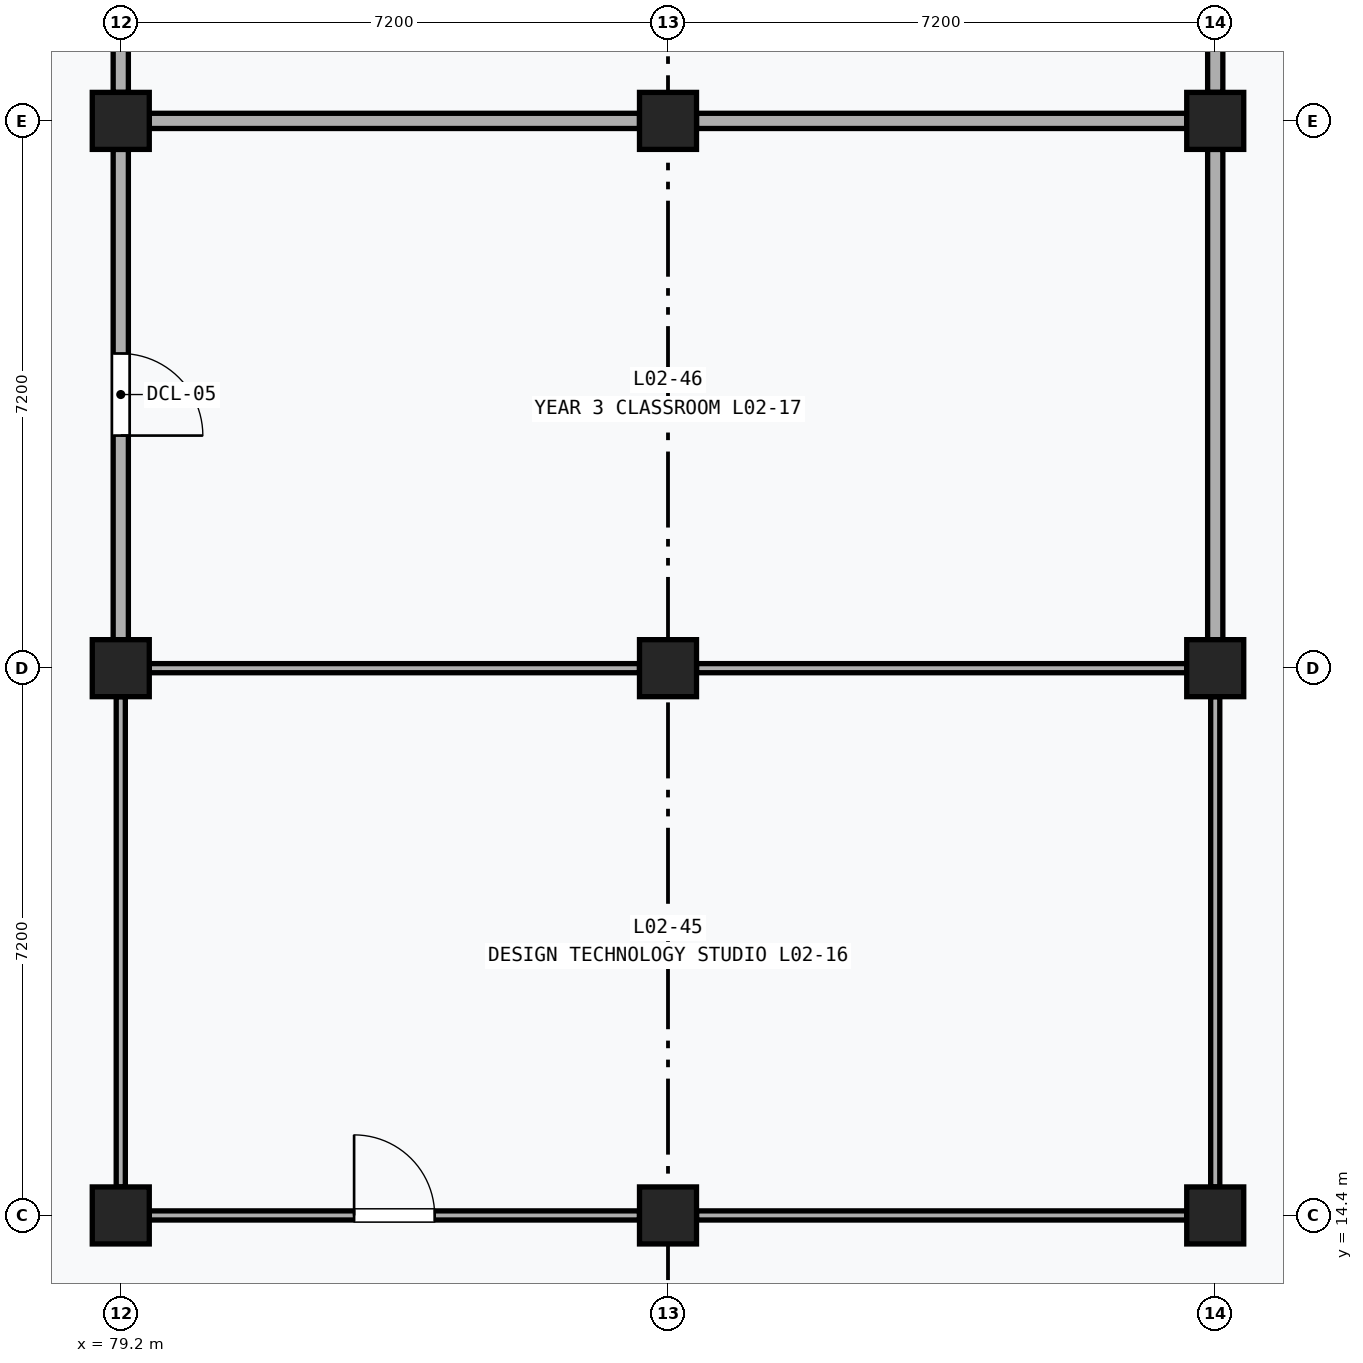
"""IFC4 building model, lengths in metres.
Left out: names, types, materials, properties, quantities, classifications, styles, units other than length and angle.
Written with IfcOpenShell. Run it as: python <this file> out.ifc"""

import sys

from ifc_helpers import new_model, si_unit, direction, frame, frame_2d, origin, origin_2d, place, context, subcontext, project, spatial, rectangle, extrude, element, fill, save


model = new_model("IFC4")
c1 = context("Model", 3, precision=1e-05, world=origin(), true_north=direction((0.0, 1.0)))
c2 = subcontext(c1, "Body", "Model", "MODEL_VIEW")
j1 = project(units=[si_unit("LENGTHUNIT", "METRE"), si_unit("PLANEANGLEUNIT", "RADIAN")], contexts=[c1])
p1 = place(None, origin())
s1 = spatial("IfcSite", under=j1, at=p1, CompositionType="ELEMENT")
p2 = place(p1, origin())
s2 = spatial("IfcBuilding", under=s1, at=p2, CompositionType="ELEMENT")
p3 = place(p2, frame((0.0, 0.0, 9.6)))
s3 = spatial("IfcBuildingStorey", under=s2, at=p3, CompositionType="ELEMENT", Elevation=9.6)
for number, where, z_axis, x_axis in (
    (1, (79.2, 14.4, 0.0), (0.0, 0.0, 1.0), (1.0, 0.0, 0.0)),
    (2, (79.2, 21.6, 0.0), (0.0, 0.0, 1.0), (1.0, 0.0, 0.0)),
    (3, (79.2, 28.8, 0.0), (0.0, 0.0, 1.0), (1.0, 0.0, 0.0)),
    (4, (86.4, 14.4, 0.0), (0.0, 0.0, 1.0), (1.0, 0.0, 0.0)),
    (5, (86.4, 21.6, 0.0), (0.0, 0.0, 1.0), (1.0, 0.0, 0.0)),
    (6, (86.4, 28.8, 0.0), (0.0, 0.0, 1.0), (1.0, 0.0, 0.0)),
    (7, (93.6, 14.4, 0.0), (0.0, 0.0, 1.0), (1.0, 0.0, 0.0)),
    (8, (93.6, 21.6, 0.0), (0.0, 0.0, 1.0), (1.0, 0.0, 0.0)),
    (9, (93.6, 28.8, 0.0), (0.0, 0.0, 1.0), (1.0, 0.0, 0.0)),
):
    element("IfcColumn", number, at=place(p3, frame(where, z_axis=z_axis, x_axis=x_axis)), inside=s3, PredefinedType="COLUMN", context=c2, shape_type="SweptSolid", body=[
        extrude(rectangle(XDim=0.75, YDim=0.75, at=origin_2d()), origin(), (0.0, 0.0, 1.0), 4.8),
    ])
p4 = place(p3, frame((79.575, 14.4, 0.0), z_axis=(0.0, 0.0, 1.0), x_axis=(1.0, 0.0, 0.0)))
e10 = element("IfcWall", 10, at=p4, inside=s3, PredefinedType="MOVABLE", context=c2, shape_type="SweptSolid", body=[
    extrude(rectangle(XDim=6.45, YDim=0.12, at=frame_2d((3.225, 0.0))), origin(), (0.0, 0.0, 1.0), 3.74),
])
p5 = place(p4, frame((2.695, 0.0, 0.0)))
e11 = element("IfcOpeningElement", 11, at=p5, cuts=e10, PredefinedType="OPENING", context=c2, shape_type="SweptSolid", body=[
    extrude(rectangle(XDim=1.06, YDim=2.16, at=frame_2d((0.53, 1.08))), frame((0.0, 0.072, 0.0), z_axis=(0.0, -1.0, 0.0), x_axis=(1.0, 0.0, 0.0)), (0.0, 0.0, 1.0), 0.144),
])
p6 = place(p3, frame((79.575, 21.6, 0.0), z_axis=(0.0, 0.0, 1.0), x_axis=(1.0, 0.0, 0.0)))
e12 = element("IfcWall", 12, at=p6, inside=s3, PredefinedType="MOVABLE", context=c2, shape_type="SweptSolid", body=[
    extrude(rectangle(XDim=6.45, YDim=0.12, at=frame_2d((3.225, 0.0))), origin(), (0.0, 0.0, 1.0), 3.74),
])
for number, where, z_axis, x_axis in (
    (13, (79.2, 14.775, 0.0), (0.0, 0.0, 1.0), (0.0, 1.0, 0.0)),
    (14, (86.775, 14.4, 0.0), (0.0, 0.0, 1.0), (1.0, 0.0, 0.0)),
    (15, (86.775, 21.6, 0.0), (0.0, 0.0, 1.0), (1.0, 0.0, 0.0)),
    (16, (93.6, 14.775, 0.0), (0.0, 0.0, 1.0), (0.0, 1.0, 0.0)),
):
    element("IfcWall", number, at=place(p3, frame(where, z_axis=z_axis, x_axis=x_axis)), inside=s3, PredefinedType="MOVABLE", context=c2, shape_type="SweptSolid", body=[
        extrude(rectangle(XDim=6.45, YDim=0.12, at=frame_2d((3.225, 0.0))), origin(), (0.0, 0.0, 1.0), 3.74),
    ])
p7 = place(p3, frame((79.575, 28.8, 0.0), z_axis=(0.0, 0.0, 1.0), x_axis=(1.0, 0.0, 0.0)))
e17 = element("IfcWall", 17, at=p7, inside=s3, PredefinedType="PARTITIONING", context=c2, shape_type="SweptSolid", body=[
    extrude(rectangle(XDim=6.45, YDim=0.2, at=frame_2d((3.225, 0.0))), origin(), (0.0, 0.0, 1.0), 3.74),
])
p8 = place(p3, frame((79.2, 21.975, 0.0), z_axis=(0.0, 0.0, 1.0), x_axis=(0.0, 1.0, 0.0)))
e18 = element("IfcWall", 18, at=p8, inside=s3, PredefinedType="PARTITIONING", context=c2, shape_type="SweptSolid", body=[
    extrude(rectangle(XDim=6.45, YDim=0.2, at=frame_2d((3.225, 0.0))), origin(), (0.0, 0.0, 1.0), 3.74),
])
p9 = place(p8, frame((2.685, 0.0, 0.0)))
e19 = element("IfcOpeningElement", 19, at=p9, cuts=e18, PredefinedType="OPENING", context=c2, shape_type="SweptSolid", body=[
    extrude(rectangle(XDim=1.08, YDim=2.18, at=frame_2d((0.54, 1.09))), frame((0.0, 0.112, 0.0), z_axis=(0.0, -1.0, 0.0), x_axis=(1.0, 0.0, 0.0)), (0.0, 0.0, 1.0), 0.224),
])
p10 = place(p3, frame((86.775, 28.8, 0.0), z_axis=(0.0, 0.0, 1.0), x_axis=(1.0, 0.0, 0.0)))
e20 = element("IfcWall", 20, at=p10, inside=s3, PredefinedType="PARTITIONING", context=c2, shape_type="SweptSolid", body=[
    extrude(rectangle(XDim=6.45, YDim=0.2, at=frame_2d((3.225, 0.0))), origin(), (0.0, 0.0, 1.0), 3.81),
])
p11 = place(p3, frame((93.6, 21.975, 0.0), z_axis=(0.0, 0.0, 1.0), x_axis=(0.0, 1.0, 0.0)))
e21 = element("IfcWall", 21, at=p11, inside=s3, PredefinedType="PARTITIONING", context=c2, shape_type="SweptSolid", body=[
    extrude(rectangle(XDim=6.45, YDim=0.2, at=frame_2d((3.225, 0.0))), origin(), (0.0, 0.0, 1.0), 3.74),
])
p12 = place(p3, frame((79.2, 29.175, 0.0), z_axis=(0.0, 0.0, 1.0), x_axis=(0.0, 1.0, 0.0)))
e22 = element("IfcWall", 22, at=p12, inside=s3, PredefinedType="PARTITIONING", context=c2, shape_type="SweptSolid", body=[
    extrude(rectangle(XDim=6.45, YDim=0.2, at=frame_2d((3.225, 0.0))), origin(), (0.0, 0.0, 1.0), 3.74),
])
p13 = place(p12, frame((2.665, 0.0, 0.0)))
e23 = element("IfcOpeningElement", 23, at=p13, cuts=e22, PredefinedType="OPENING", context=c2, shape_type="SweptSolid", body=[
    extrude(rectangle(XDim=1.12, YDim=2.2, at=frame_2d((0.56, 1.1))), frame((0.0, 0.112, 0.0), z_axis=(0.0, -1.0, 0.0), x_axis=(1.0, 0.0, 0.0)), (0.0, 0.0, 1.0), 0.224),
])
p14 = place(p3, frame((93.6, 29.175, 0.0), z_axis=(0.0, 0.0, 1.0), x_axis=(0.0, 1.0, 0.0)))
e24 = element("IfcWall", 24, at=p14, inside=s3, PredefinedType="PARTITIONING", context=c2, shape_type="SweptSolid", body=[
    extrude(rectangle(XDim=6.45, YDim=0.2, at=frame_2d((3.225, 0.0))), origin(), (0.0, 0.0, 1.0), 3.74),
])
p15 = place(p5, origin())
e25 = element("IfcDoor", 25, at=p15, inside=s3, OperationType="SINGLE_SWING_LEFT", PredefinedType="DOOR", context=c2, shape_type="SweptSolid", body=[
    extrude(rectangle(XDim=1.06, YDim=2.16, at=frame_2d((0.53, 1.08))), frame((0.0, 0.025, 0.0), z_axis=(0.0, -1.0, 0.0), x_axis=(1.0, 0.0, 0.0)), (0.0, 0.0, 1.0), 0.05),
])
fill(e11, e25)
p16 = place(p9, frame((1.08, 0.0, 0.0), z_axis=(0.0, 0.0, 1.0), x_axis=(-1.0, 0.0, 0.0)))
e26 = element("IfcDoor", 26, at=p16, inside=s3, OperationType="SINGLE_SWING_RIGHT", PredefinedType="DOOR", context=c2, shape_type="SweptSolid", body=[
    extrude(rectangle(XDim=1.08, YDim=2.18, at=frame_2d((0.54, 1.09))), frame((0.0, 0.025, 0.0), z_axis=(0.0, -1.0, 0.0), x_axis=(1.0, 0.0, 0.0)), (0.0, 0.0, 1.0), 0.05),
])
fill(e19, e26)
save(model, sys.argv[1])
